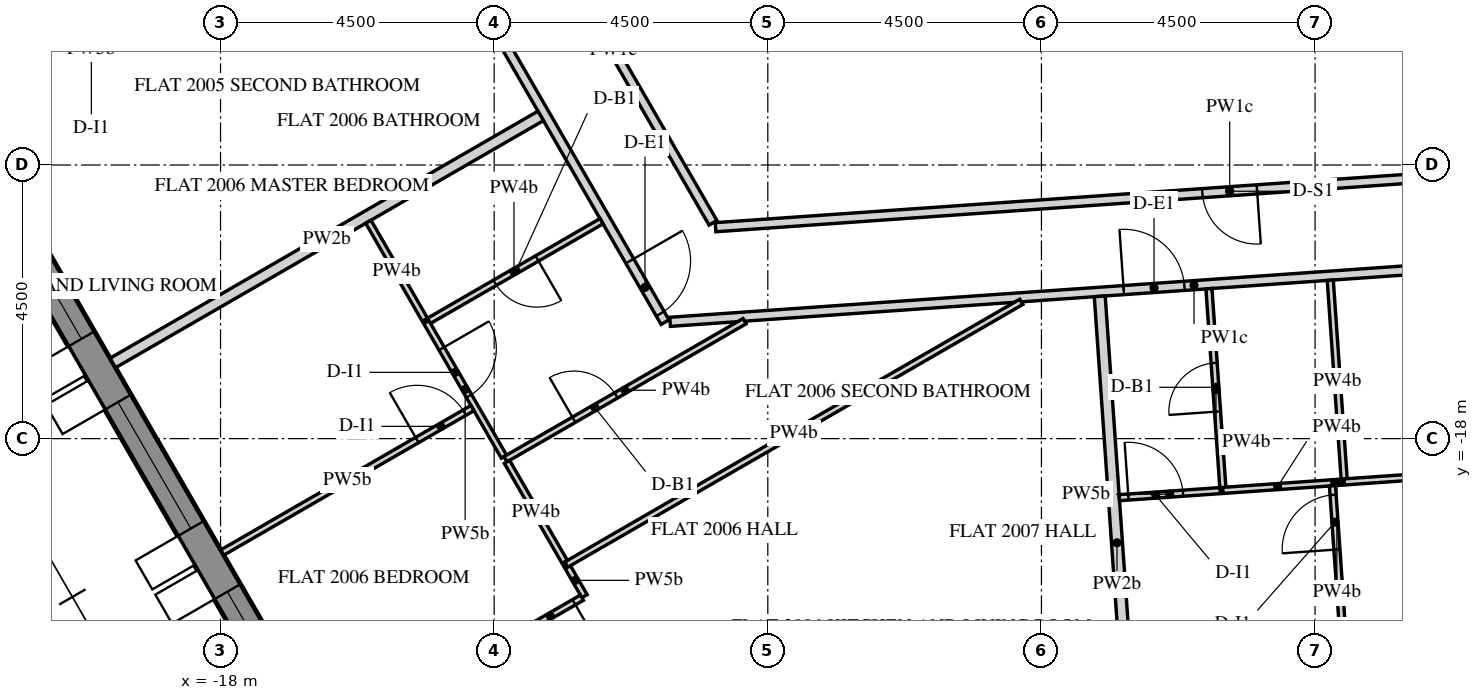
"""IFC4 building model, lengths in metres.
Left out: names, types, materials, properties, quantities, classifications, styles, units other than length and angle.
Written with IfcOpenShell. Run it as: python <this file> out.ifc"""

import sys

from ifc_helpers import new_model, si_unit, direction, frame, frame_2d, origin, place, context, subcontext, project, spatial, polyline, rectangle, outline, extrude, element, fill, save


model = new_model("IFC4")
c1 = context("Model", 3, precision=1e-05, world=origin(), true_north=direction((0.0, 1.0)))
c2 = subcontext(c1, "Body", "Model", "MODEL_VIEW")
j1 = project(units=[si_unit("LENGTHUNIT", "METRE"), si_unit("PLANEANGLEUNIT", "RADIAN")], contexts=[c1])
p1 = place(None, origin())
s1 = spatial("IfcSite", under=j1, at=p1, CompositionType="ELEMENT")
p2 = place(p1, origin())
s2 = spatial("IfcBuilding", under=s1, at=p2, CompositionType="ELEMENT")
p3 = place(p2, frame((0.0, 0.0, 256.2)))
s3 = spatial("IfcBuildingStorey", under=s2, at=p3, CompositionType="ELEMENT", Elevation=256.2)
p4 = place(p3, frame((-28.149, -2.745, 0.0), z_axis=(0.0, 0.0, 1.0), x_axis=(0.500003737743, -0.866023245787, 0.0)))
e1 = element("IfcWall", 1, at=p4, inside=s3, PredefinedType="SOLIDWALL", context=c2, shape_type="SweptSolid", body=[
    extrude(outline(polyline([(-0.021, -0.25), (25.468, -0.25), (25.421, 0.25), (0.021, 0.25), (-0.021, -0.25)])), origin(), (0.0, 0.0, 1.0), 3.75),
])
p5 = place(p4, frame((2.522, 0.0, 0.6)))
e2 = element("IfcOpeningElement", 2, at=p5, cuts=e1, PredefinedType="OPENING", context=c2, shape_type="SweptSolid", body=[
    extrude(rectangle(XDim=2.4, YDim=2.7, at=frame_2d((1.2, 1.35))), frame((0.0, 0.26, 0.0), z_axis=(0.0, -1.0, 0.0), x_axis=(1.0, 0.0, 0.0)), (0.0, 0.0, 1.0), 0.52),
])
p6 = place(p4, frame((6.122, 0.0, 0.6)))
e3 = element("IfcOpeningElement", 3, at=p6, cuts=e1, PredefinedType="OPENING", context=c2, shape_type="SweptSolid", body=[
    extrude(rectangle(XDim=2.4, YDim=2.7, at=frame_2d((1.2, 1.35))), frame((0.0, 0.26, 0.0), z_axis=(0.0, -1.0, 0.0), x_axis=(1.0, 0.0, 0.0)), (0.0, 0.0, 1.0), 0.52),
])
p7 = place(p4, frame((9.722, 0.0, 0.6)))
e4 = element("IfcOpeningElement", 4, at=p7, cuts=e1, PredefinedType="OPENING", context=c2, shape_type="SweptSolid", body=[
    extrude(rectangle(XDim=2.4, YDim=2.7, at=frame_2d((1.2, 1.35))), frame((0.0, 0.26, 0.0), z_axis=(0.0, -1.0, 0.0), x_axis=(1.0, 0.0, 0.0)), (0.0, 0.0, 1.0), 0.52),
])
p8 = place(p4, frame((13.323, 0.0, 0.6)))
e5 = element("IfcOpeningElement", 5, at=p8, cuts=e1, PredefinedType="OPENING", context=c2, shape_type="SweptSolid", body=[
    extrude(rectangle(XDim=2.4, YDim=2.7, at=frame_2d((1.2, 1.35))), frame((0.0, 0.26, 0.0), z_axis=(0.0, -1.0, 0.0), x_axis=(1.0, 0.0, 0.0)), (0.0, 0.0, 1.0), 0.52),
])
p9 = place(p4, frame((16.922, 0.0, 0.6)))
e6 = element("IfcOpeningElement", 6, at=p9, cuts=e1, PredefinedType="OPENING", context=c2, shape_type="SweptSolid", body=[
    extrude(rectangle(XDim=2.4, YDim=2.7, at=frame_2d((1.2, 1.35))), frame((0.0, 0.26, 0.0), z_axis=(0.0, -1.0, 0.0), x_axis=(1.0, 0.0, 0.0)), (0.0, 0.0, 1.0), 0.52),
])
p10 = place(p4, frame((20.522, 0.0, 0.6)))
e7 = element("IfcOpeningElement", 7, at=p10, cuts=e1, PredefinedType="OPENING", context=c2, shape_type="SweptSolid", body=[
    extrude(rectangle(XDim=2.4, YDim=2.7, at=frame_2d((1.2, 1.35))), frame((0.0, 0.26, 0.0), z_axis=(0.0, -1.0, 0.0), x_axis=(1.0, 0.0, 0.0)), (0.0, 0.0, 1.0), 0.52),
])
p11 = place(p3, frame((-18.338, -2.838, 0.0), z_axis=(0.0, 0.0, 1.0), x_axis=(0.499999693481, -0.866025580753, 0.0)))
e8 = element("IfcWall", 8, at=p11, inside=s3, PredefinedType="PARTITIONING", context=c2, shape_type="SweptSolid", body=[
    extrude(rectangle(XDim=15.296, YDim=0.15, at=frame_2d((7.648, 0.0))), origin(), (0.0, 0.0, 1.0), 2.823),
])
p12 = place(p11, frame((2.925, 0.0, 0.0)))
e9 = element("IfcOpeningElement", 9, at=p12, cuts=e8, PredefinedType="OPENING", context=c2, shape_type="SweptSolid", body=[
    extrude(rectangle(XDim=1.0, YDim=2.1, at=frame_2d((0.5, 1.05))), frame((0.0, 0.085, 0.0), z_axis=(0.0, -1.0, 0.0), x_axis=(1.0, 0.0, 0.0)), (0.0, 0.0, 1.0), 0.17),
])
p13 = place(p11, frame((14.136, 0.0, 0.0)))
e10 = element("IfcOpeningElement", 10, at=p13, cuts=e8, PredefinedType="OPENING", context=c2, shape_type="SweptSolid", body=[
    extrude(rectangle(XDim=1.0, YDim=2.1, at=frame_2d((0.5, 1.05))), frame((0.0, 0.085, 0.0), z_axis=(0.0, -1.0, 0.0), x_axis=(1.0, 0.0, 0.0)), (0.0, 0.0, 1.0), 0.17),
])
p14 = place(p3, frame((-10.606, -16.079, 0.0), z_axis=(0.0, 0.0, 1.0), x_axis=(0.997563356349, 0.069766396426, 0.0)))
e11 = element("IfcWall", 11, at=p14, inside=s3, PredefinedType="PARTITIONING", context=c2, shape_type="SweptSolid", body=[
    extrude(rectangle(XDim=17.273, YDim=0.15, at=frame_2d((8.636, 0.0))), origin(), (0.0, 0.0, 1.0), 2.823),
])
p15 = place(p14, frame((7.478, 0.0, 0.0)))
e12 = element("IfcOpeningElement", 12, at=p15, cuts=e11, PredefinedType="OPENING", context=c2, shape_type="SweptSolid", body=[
    extrude(rectangle(XDim=1.0, YDim=2.1, at=frame_2d((0.5, 1.05))), frame((0.0, 0.085, 0.0), z_axis=(0.0, -1.0, 0.0), x_axis=(1.0, 0.0, 0.0)), (0.0, 0.0, 1.0), 0.17),
])
p16 = place(p3, frame((7.051, -13.341, 0.0), z_axis=(0.0, 0.0, 1.0), x_axis=(-0.997563599815, -0.069762915103, 0.0)))
e13 = element("IfcWall", 13, at=p16, inside=s3, PredefinedType="PARTITIONING", context=c2, shape_type="SweptSolid", body=[
    extrude(rectangle(XDim=16.952, YDim=0.15, at=frame_2d((8.476, 0.0))), origin(), (0.0, 0.0, 1.0), 2.823),
])
p17 = place(p16, frame((8.026, 0.0, 0.0)))
e14 = element("IfcOpeningElement", 14, at=p17, cuts=e13, PredefinedType="OPENING", context=c2, shape_type="SweptSolid", body=[
    extrude(rectangle(XDim=0.9, YDim=2.1, at=frame_2d((0.45, 1.05))), frame((0.0, 0.085, 0.0), z_axis=(0.0, -1.0, 0.0), x_axis=(1.0, 0.0, 0.0)), (0.0, 0.0, 1.0), 0.17),
])
p18 = place(p3, frame((-9.901, -14.451, 0.0), z_axis=(0.0, 0.0, 1.0), x_axis=(-0.49999161165, 0.866030246746, 0.0)))
e15 = element("IfcWall", 15, at=p18, inside=s3, PredefinedType="PARTITIONING", context=c2, shape_type="SweptSolid", body=[
    extrude(rectangle(XDim=6.543, YDim=0.15, at=frame_2d((3.271, 0.0))), origin(), (0.0, 0.0, 1.0), 2.823),
])
p19 = place(p3, frame((-19.771, -16.755, 0.0), z_axis=(0.0, 0.0, 1.0), x_axis=(0.866022959057, 0.500004234368, 0.0)))
e16 = element("IfcWall", 16, at=p19, inside=s3, PredefinedType="PARTITIONING", context=c2, shape_type="SweptSolid", body=[
    extrude(rectangle(XDim=8.125, YDim=0.18, at=frame_2d((4.062, 0.0))), origin(), (0.0, 0.0, 1.0), 2.823),
])
p20 = place(p3, frame((-12.315, -20.069, 0.0), z_axis=(0.0, 0.0, 1.0), x_axis=(0.500108649621, -0.865962665808, 0.0)))
e17 = element("IfcWall", 17, at=p20, inside=s3, PredefinedType="PARTITIONING", context=c2, shape_type="SweptSolid", body=[
    extrude(rectangle(XDim=0.602, YDim=0.1, at=frame_2d((0.301, 0.0))), origin(), (0.0, 0.0, 1.0), 2.823),
])
p21 = place(p3, frame((-12.058, -20.615, 0.0), z_axis=(0.0, 0.0, 1.0), x_axis=(-0.866020389056, -0.500008685663, 0.0)))
e18 = element("IfcWall", 18, at=p21, inside=s3, PredefinedType="PARTITIONING", context=c2, shape_type="SweptSolid", body=[
    extrude(rectangle(XDim=4.75, YDim=0.1, at=frame_2d((2.375, 0.0))), origin(), (0.0, 0.0, 1.0), 2.823),
])
p22 = place(p21, frame((0.15, 0.0, 0.0)))
e19 = element("IfcOpeningElement", 19, at=p22, cuts=e18, PredefinedType="OPENING", context=c2, shape_type="SweptSolid", body=[
    extrude(rectangle(XDim=0.9, YDim=2.1, at=frame_2d((0.45, 1.05))), frame((0.0, 0.06, 0.0), z_axis=(0.0, -1.0, 0.0), x_axis=(1.0, 0.0, 0.0)), (0.0, 0.0, 1.0), 0.12),
])
p23 = place(p3, frame((-4.831, -15.75, 0.0), z_axis=(0.0, 0.0, 1.0), x_axis=(-0.866012441049, -0.500022451445, 0.0)))
e20 = element("IfcWall", 20, at=p23, inside=s3, PredefinedType="PARTITIONING", context=c2, shape_type="SweptSolid", body=[
    extrude(rectangle(XDim=8.641, YDim=0.1, at=frame_2d((4.321, 0.0))), origin(), (0.0, 0.0, 1.0), 2.823),
])
p24 = place(p3, frame((-2.974, -23.765, 0.0), z_axis=(0.0, 0.0, 1.0), x_axis=(-0.069771417753, 0.99756300516, 0.0)))
e21 = element("IfcWall", 21, at=p24, inside=s3, PredefinedType="PARTITIONING", context=c2, shape_type="SweptSolid", body=[
    extrude(rectangle(XDim=8.125, YDim=0.18, at=frame_2d((4.062, 0.0))), origin(), (0.0, 0.0, 1.0), 2.823),
])
p25 = place(p3, frame((-11.735, -14.425, 0.0), z_axis=(0.0, 0.0, 1.0), x_axis=(-0.866033959199, -0.499985181294, 0.0)))
e22 = element("IfcWall", 22, at=p25, inside=s3, PredefinedType="PARTITIONING", context=c2, shape_type="SweptSolid", body=[
    extrude(rectangle(XDim=3.325, YDim=0.1, at=frame_2d((1.662, 0.0))), origin(), (0.0, 0.0, 1.0), 2.823),
])
p26 = place(p25, frame((1.225, 0.0, 0.0)))
e23 = element("IfcOpeningElement", 23, at=p26, cuts=e22, PredefinedType="OPENING", context=c2, shape_type="SweptSolid", body=[
    extrude(rectangle(XDim=0.8, YDim=2.1, at=frame_2d((0.4, 1.05))), frame((0.0, 0.06, 0.0), z_axis=(0.0, -1.0, 0.0), x_axis=(1.0, 0.0, 0.0)), (0.0, 0.0, 1.0), 0.12),
])
p27 = place(p3, frame((-14.615, -16.085, 0.0), z_axis=(0.0, 0.0, 1.0), x_axis=(0.499943114462, -0.866058244174, 0.0)))
e24 = element("IfcWall", 24, at=p27, inside=s3, PredefinedType="PARTITIONING", context=c2, shape_type="SweptSolid", body=[
    extrude(rectangle(XDim=2.554, YDim=0.1, at=frame_2d((1.277, 0.0))), origin(), (0.0, 0.0, 1.0), 2.823),
])
p28 = place(p27, frame((0.502, 0.0, 0.0)))
e25 = element("IfcOpeningElement", 25, at=p28, cuts=e24, PredefinedType="OPENING", context=c2, shape_type="SweptSolid", body=[
    extrude(rectangle(XDim=0.9, YDim=2.1, at=frame_2d((0.45, 1.05))), frame((0.0, 0.06, 0.0), z_axis=(0.0, -1.0, 0.0), x_axis=(1.0, 0.0, 0.0)), (0.0, 0.0, 1.0), 0.12),
])
p29 = place(p3, frame((-13.314, -18.339, 0.0), z_axis=(0.0, 0.0, 1.0), x_axis=(0.866020827114, 0.500007926942, 0.0)))
e26 = element("IfcWall", 26, at=p29, inside=s3, PredefinedType="PARTITIONING", context=c2, shape_type="SweptSolid", body=[
    extrude(rectangle(XDim=4.541, YDim=0.1, at=frame_2d((2.27, 0.0))), origin(), (0.0, 0.0, 1.0), 2.823),
])
p30 = place(p29, frame((1.3, 0.0, 0.0)))
e27 = element("IfcOpeningElement", 27, at=p30, cuts=e26, PredefinedType="OPENING", context=c2, shape_type="SweptSolid", body=[
    extrude(rectangle(XDim=0.8, YDim=2.1, at=frame_2d((0.4, 1.05))), frame((0.0, 0.06, 0.0), z_axis=(0.0, -1.0, 0.0), x_axis=(1.0, 0.0, 0.0)), (0.0, 0.0, 1.0), 0.12),
])
p31 = place(p3, frame((-15.569, -14.433, 0.0), z_axis=(0.0, 0.0, 1.0), x_axis=(0.499960808225, -0.866048029984, 0.0)))
e28 = element("IfcWall", 28, at=p31, inside=s3, PredefinedType="PARTITIONING", context=c2, shape_type="SweptSolid", body=[
    extrude(rectangle(XDim=1.862, YDim=0.1, at=frame_2d((0.931, 0.0))), origin(), (0.0, 0.0, 1.0), 2.823),
])
p32 = place(p3, frame((-17.971, -19.873, 0.0), z_axis=(0.0, 0.0, 1.0), x_axis=(0.866020389056, 0.500008685663, 0.0)))
e29 = element("IfcWall", 29, at=p32, inside=s3, PredefinedType="PARTITIONING", context=c2, shape_type="SweptSolid", body=[
    extrude(rectangle(XDim=4.75, YDim=0.1, at=frame_2d((2.375, 0.0))), origin(), (0.0, 0.0, 1.0), 2.823),
])
p33 = place(p32, frame((3.7, 0.0, 0.0)))
e30 = element("IfcOpeningElement", 30, at=p33, cuts=e29, PredefinedType="OPENING", context=c2, shape_type="SweptSolid", body=[
    extrude(rectangle(XDim=0.9, YDim=2.1, at=frame_2d((0.45, 1.05))), frame((0.0, 0.06, 0.0), z_axis=(0.0, -1.0, 0.0), x_axis=(1.0, 0.0, 0.0)), (0.0, 0.0, 1.0), 0.12),
])
p34 = place(p3, frame((-12.339, -20.028, 0.0), z_axis=(0.0, 0.0, 1.0), x_axis=(-0.500022797313, 0.86601224135, 0.0)))
e31 = element("IfcWall", 31, at=p34, inside=s3, PredefinedType="PARTITIONING", context=c2, shape_type="SweptSolid", body=[
    extrude(rectangle(XDim=1.9, YDim=0.1, at=frame_2d((0.95, 0.0))), origin(), (0.0, 0.0, 1.0), 2.823),
])
p35 = place(p3, frame((0.25, -15.395, 0.0), z_axis=(0.0, 0.0, 1.0), x_axis=(0.069754598287, -0.997564181403, 0.0)))
e32 = element("IfcWall", 32, at=p35, inside=s3, PredefinedType="PARTITIONING", context=c2, shape_type="SweptSolid", body=[
    extrude(rectangle(XDim=3.325, YDim=0.1, at=frame_2d((1.663, 0.0))), origin(), (0.0, 0.0, 1.0), 2.823),
])
p36 = place(p3, frame((0.48, -18.712, 0.0), z_axis=(0.0, 0.0, 1.0), x_axis=(0.997564312984, 0.069752716511, 0.0)))
e33 = element("IfcWall", 33, at=p36, inside=s3, PredefinedType="PARTITIONING", context=c2, shape_type="SweptSolid", body=[
    extrude(rectangle(XDim=3.402, YDim=0.1, at=frame_2d((1.701, 0.0))), origin(), (0.0, 0.0, 1.0), 2.823),
])
p37 = place(p36, frame((1.152, 0.0, 0.0)))
e34 = element("IfcOpeningElement", 34, at=p37, cuts=e33, PredefinedType="OPENING", context=c2, shape_type="SweptSolid", body=[
    extrude(rectangle(XDim=0.9, YDim=2.1, at=frame_2d((0.45, 1.05))), frame((0.0, 0.06, 0.0), z_axis=(0.0, -1.0, 0.0), x_axis=(1.0, 0.0, 0.0)), (0.0, 0.0, 1.0), 0.12),
])
p38 = place(p3, frame((-1.513, -18.852, 0.0), z_axis=(0.0, 0.0, 1.0), x_axis=(-0.069754598287, 0.997564181403, 0.0)))
e35 = element("IfcWall", 35, at=p38, inside=s3, PredefinedType="PARTITIONING", context=c2, shape_type="SweptSolid", body=[
    extrude(rectangle(XDim=3.325, YDim=0.1, at=frame_2d((1.663, 0.0))), origin(), (0.0, 0.0, 1.0), 2.823),
])
p39 = place(p38, frame((1.3, 0.0, 0.0)))
e36 = element("IfcOpeningElement", 36, at=p39, cuts=e35, PredefinedType="OPENING", context=c2, shape_type="SweptSolid", body=[
    extrude(rectangle(XDim=0.8, YDim=2.1, at=frame_2d((0.4, 1.05))), frame((0.0, 0.06, 0.0), z_axis=(0.0, -1.0, 0.0), x_axis=(1.0, 0.0, 0.0)), (0.0, 0.0, 1.0), 0.12),
])
p40 = place(p3, frame((-3.219, -18.971, 0.0), z_axis=(0.0, 0.0, 1.0), x_axis=(0.9975627517, 0.069775041534, 0.0)))
e37 = element("IfcWall", 37, at=p40, inside=s3, PredefinedType="PARTITIONING", context=c2, shape_type="SweptSolid", body=[
    extrude(rectangle(XDim=1.662, YDim=0.1, at=frame_2d((0.831, 0.0))), origin(), (0.0, 0.0, 1.0), 2.823),
])
p41 = place(p40, frame((0.15, 0.0, 0.0)))
e38 = element("IfcOpeningElement", 38, at=p41, cuts=e37, PredefinedType="OPENING", context=c2, shape_type="SweptSolid", body=[
    extrude(rectangle(XDim=0.9, YDim=2.1, at=frame_2d((0.45, 1.05))), frame((0.0, 0.06, 0.0), z_axis=(0.0, -1.0, 0.0), x_axis=(1.0, 0.0, 0.0)), (0.0, 0.0, 1.0), 0.12),
])
p42 = place(p3, frame((-1.515, -18.852, 0.0), z_axis=(0.0, 0.0, 1.0), x_axis=(0.997562835018, 0.069773850337, 0.0)))
e39 = element("IfcWall", 39, at=p42, inside=s3, PredefinedType="PARTITIONING", context=c2, shape_type="SweptSolid", body=[
    extrude(rectangle(XDim=1.802, YDim=0.1, at=frame_2d((0.901, 0.0))), origin(), (0.0, 0.0, 1.0), 2.823),
])
p43 = place(p3, frame((0.282, -18.726, 0.0), z_axis=(0.0, 0.0, 1.0), x_axis=(0.997611278984, 0.069077753617, 0.0)))
e40 = element("IfcWall", 40, at=p43, inside=s3, PredefinedType="PARTITIONING", context=c2, shape_type="SweptSolid", body=[
    extrude(rectangle(XDim=0.152, YDim=0.1, at=frame_2d((0.076, 0.0))), origin(), (0.0, 0.0, 1.0), 2.823),
])
p44 = place(p3, frame((0.617, -23.514, 0.0), z_axis=(0.0, 0.0, 1.0), x_axis=(-0.069749334994, 0.997564549424, 0.0)))
e41 = element("IfcWall", 41, at=p44, inside=s3, PredefinedType="PARTITIONING", context=c2, shape_type="SweptSolid", body=[
    extrude(rectangle(XDim=4.75, YDim=0.1, at=frame_2d((2.375, 0.0))), origin(), (0.0, 0.0, 1.0), 2.823),
])
p45 = place(p44, frame((3.7, 0.0, 0.0)))
e42 = element("IfcOpeningElement", 42, at=p45, cuts=e41, PredefinedType="OPENING", context=c2, shape_type="SweptSolid", body=[
    extrude(rectangle(XDim=0.9, YDim=2.1, at=frame_2d((0.45, 1.05))), frame((0.0, 0.06, 0.0), z_axis=(0.0, -1.0, 0.0), x_axis=(1.0, 0.0, 0.0)), (0.0, 0.0, 1.0), 0.12),
])
p46 = place(p8, frame((0.0, 0.18, 0.0)))
e43 = element("IfcWindow", 43, at=p46, inside=s3, PartitioningType="DOUBLE_PANEL_VERTICAL", PredefinedType="WINDOW", context=c2, shape_type="SweptSolid", body=[
    extrude(rectangle(XDim=2.4, YDim=2.7, at=frame_2d((1.2, 1.35))), frame((0.0, 0.03, 0.0), z_axis=(0.0, -1.0, 0.0), x_axis=(1.0, 0.0, 0.0)), (0.0, 0.0, 1.0), 0.06),
])
fill(e5, e43)
p47 = place(p9, frame((0.0, 0.18, 0.0)))
e44 = element("IfcWindow", 44, at=p47, inside=s3, PartitioningType="DOUBLE_PANEL_VERTICAL", PredefinedType="WINDOW", context=c2, shape_type="SweptSolid", body=[
    extrude(rectangle(XDim=2.4, YDim=2.7, at=frame_2d((1.2, 1.35))), frame((0.0, 0.03, 0.0), z_axis=(0.0, -1.0, 0.0), x_axis=(1.0, 0.0, 0.0)), (0.0, 0.0, 1.0), 0.06),
])
fill(e6, e44)
p48 = place(p10, frame((0.0, 0.18, 0.0)))
e45 = element("IfcWindow", 45, at=p48, inside=s3, PartitioningType="DOUBLE_PANEL_VERTICAL", PredefinedType="WINDOW", context=c2, shape_type="SweptSolid", body=[
    extrude(rectangle(XDim=2.4, YDim=2.7, at=frame_2d((1.2, 1.35))), frame((0.0, 0.03, 0.0), z_axis=(0.0, -1.0, 0.0), x_axis=(1.0, 0.0, 0.0)), (0.0, 0.0, 1.0), 0.06),
])
fill(e7, e45)
p49 = place(p13, origin())
e46 = element("IfcDoor", 46, at=p49, inside=s3, OperationType="SINGLE_SWING_LEFT", PredefinedType="DOOR", context=c2, shape_type="SweptSolid", body=[
    extrude(rectangle(XDim=1.0, YDim=2.1, at=frame_2d((0.5, 1.05))), frame((0.0, 0.025, 0.0), z_axis=(0.0, -1.0, 0.0), x_axis=(1.0, 0.0, 0.0)), (0.0, 0.0, 1.0), 0.05),
])
fill(e10, e46)
p50 = place(p26, origin())
e47 = element("IfcDoor", 47, at=p50, inside=s3, OperationType="SINGLE_SWING_RIGHT", PredefinedType="DOOR", context=c2, shape_type="SweptSolid", body=[
    extrude(rectangle(XDim=0.8, YDim=2.1, at=frame_2d((0.4, 1.05))), frame((0.0, 0.025, 0.0), z_axis=(0.0, -1.0, 0.0), x_axis=(1.0, 0.0, 0.0)), (0.0, 0.0, 1.0), 0.05),
])
fill(e23, e47)
p51 = place(p28, origin())
e48 = element("IfcDoor", 48, at=p51, inside=s3, OperationType="SINGLE_SWING_LEFT", PredefinedType="DOOR", context=c2, shape_type="SweptSolid", body=[
    extrude(rectangle(XDim=0.9, YDim=2.1, at=frame_2d((0.45, 1.05))), frame((0.0, 0.025, 0.0), z_axis=(0.0, -1.0, 0.0), x_axis=(1.0, 0.0, 0.0)), (0.0, 0.0, 1.0), 0.05),
])
fill(e25, e48)
p52 = place(p33, origin())
e49 = element("IfcDoor", 49, at=p52, inside=s3, OperationType="SINGLE_SWING_RIGHT", PredefinedType="DOOR", context=c2, shape_type="SweptSolid", body=[
    extrude(rectangle(XDim=0.9, YDim=2.1, at=frame_2d((0.45, 1.05))), frame((0.0, 0.025, 0.0), z_axis=(0.0, -1.0, 0.0), x_axis=(1.0, 0.0, 0.0)), (0.0, 0.0, 1.0), 0.05),
])
fill(e30, e49)
p53 = place(p22, origin())
e50 = element("IfcDoor", 50, at=p53, inside=s3, OperationType="SINGLE_SWING_RIGHT", PredefinedType="DOOR", context=c2, shape_type="SweptSolid", body=[
    extrude(rectangle(XDim=0.9, YDim=2.1, at=frame_2d((0.45, 1.05))), frame((0.0, 0.025, 0.0), z_axis=(0.0, -1.0, 0.0), x_axis=(1.0, 0.0, 0.0)), (0.0, 0.0, 1.0), 0.05),
])
fill(e19, e50)
p54 = place(p30, origin())
e51 = element("IfcDoor", 51, at=p54, inside=s3, OperationType="SINGLE_SWING_RIGHT", PredefinedType="DOOR", context=c2, shape_type="SweptSolid", body=[
    extrude(rectangle(XDim=0.8, YDim=2.1, at=frame_2d((0.4, 1.05))), frame((0.0, 0.025, 0.0), z_axis=(0.0, -1.0, 0.0), x_axis=(1.0, 0.0, 0.0)), (0.0, 0.0, 1.0), 0.05),
])
fill(e27, e51)
p55 = place(p15, origin())
e52 = element("IfcDoor", 52, at=p55, inside=s3, OperationType="SINGLE_SWING_RIGHT", PredefinedType="DOOR", context=c2, shape_type="SweptSolid", body=[
    extrude(rectangle(XDim=1.0, YDim=2.1, at=frame_2d((0.5, 1.05))), frame((0.0, 0.025, 0.0), z_axis=(0.0, -1.0, 0.0), x_axis=(1.0, 0.0, 0.0)), (0.0, 0.0, 1.0), 0.05),
])
fill(e12, e52)
p56 = place(p39, origin())
e53 = element("IfcDoor", 53, at=p56, inside=s3, OperationType="SINGLE_SWING_LEFT", PredefinedType="DOOR", context=c2, shape_type="SweptSolid", body=[
    extrude(rectangle(XDim=0.8, YDim=2.1, at=frame_2d((0.4, 1.05))), frame((0.0, 0.025, 0.0), z_axis=(0.0, -1.0, 0.0), x_axis=(1.0, 0.0, 0.0)), (0.0, 0.0, 1.0), 0.05),
])
fill(e36, e53)
p57 = place(p41, origin())
e54 = element("IfcDoor", 54, at=p57, inside=s3, OperationType="SINGLE_SWING_LEFT", PredefinedType="DOOR", context=c2, shape_type="SweptSolid", body=[
    extrude(rectangle(XDim=0.9, YDim=2.1, at=frame_2d((0.45, 1.05))), frame((0.0, 0.025, 0.0), z_axis=(0.0, -1.0, 0.0), x_axis=(1.0, 0.0, 0.0)), (0.0, 0.0, 1.0), 0.05),
])
fill(e38, e54)
p58 = place(p45, origin())
e55 = element("IfcDoor", 55, at=p58, inside=s3, OperationType="SINGLE_SWING_RIGHT", PredefinedType="DOOR", context=c2, shape_type="SweptSolid", body=[
    extrude(rectangle(XDim=0.9, YDim=2.1, at=frame_2d((0.45, 1.05))), frame((0.0, 0.025, 0.0), z_axis=(0.0, -1.0, 0.0), x_axis=(1.0, 0.0, 0.0)), (0.0, 0.0, 1.0), 0.05),
])
fill(e42, e55)
p59 = place(p17, origin())
e56 = element("IfcDoor", 56, at=p59, inside=s3, OperationType="SINGLE_SWING_LEFT", PredefinedType="DOOR", context=c2, shape_type="SweptSolid", body=[
    extrude(rectangle(XDim=0.9, YDim=2.1, at=frame_2d((0.45, 1.05))), frame((0.0, 0.025, 0.0), z_axis=(0.0, -1.0, 0.0), x_axis=(1.0, 0.0, 0.0)), (0.0, 0.0, 1.0), 0.05),
])
fill(e14, e56)
save(model, sys.argv[1])
